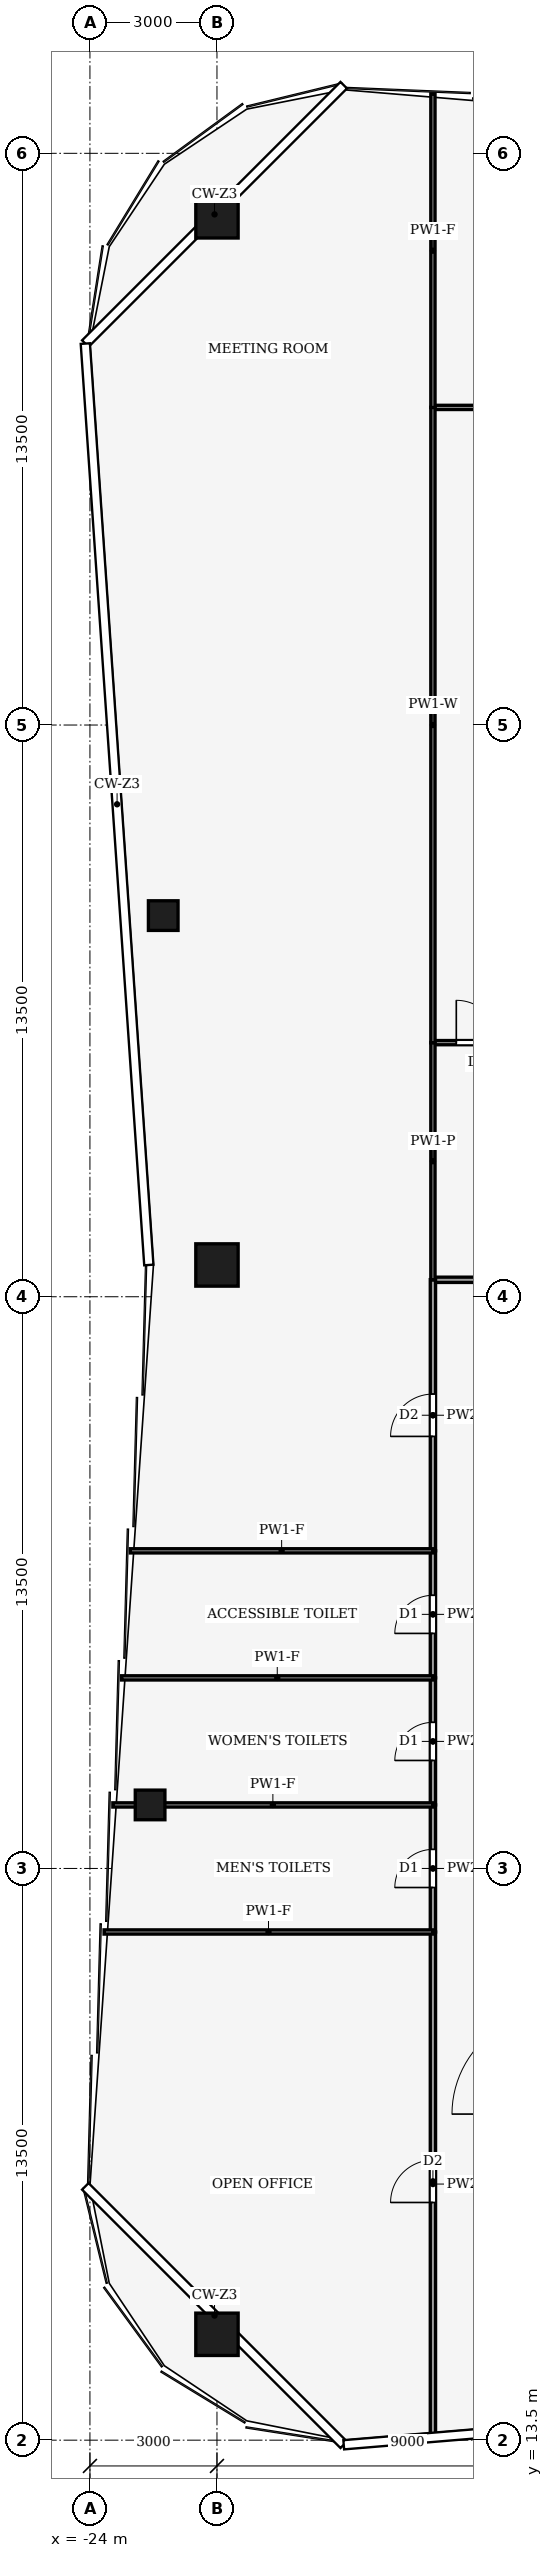
"""IFC4 building model, lengths in metres.
Left out: names, types, materials, properties, quantities, classifications, styles, units other than length and angle.
Written with IfcOpenShell. Run it as: python <this file> out.ifc"""

import sys

from ifc_helpers import new_model, si_unit, direction, frame, frame_2d, origin, origin_2d, place, context, subcontext, project, spatial, rectangle, hollow_rectangle, extrude, element, fill, save


model = new_model("IFC4")
c1 = context("Model", 3, precision=1e-05, world=origin(), true_north=direction((0.0, 1.0)))
c2 = subcontext(c1, "Body", "Model", "MODEL_VIEW")
j1 = project(units=[si_unit("LENGTHUNIT", "METRE"), si_unit("PLANEANGLEUNIT", "RADIAN")], contexts=[c1])
p1 = place(None, origin())
s1 = spatial("IfcSite", under=j1, at=p1, CompositionType="ELEMENT")
p2 = place(p1, origin())
s2 = spatial("IfcBuilding", under=s1, at=p2, CompositionType="ELEMENT")
p3 = place(p2, frame((0.0, 0.0, 198.0)))
s3 = spatial("IfcBuildingStorey", under=s2, at=p3, CompositionType="ELEMENT", Elevation=198.0)
for number, where, z_axis, x_axis in (
    (1, (-21.0, 66.0, 0.0), (0.0, 0.0, 1.0), (1.0, 0.0, 0.0)),
    (2, (-21.0, 16.0, 0.0), (0.0, 0.0, 1.0), (1.0, 0.0, 0.0)),
    (3, (-21.0, 41.25, 0.0), (0.0, 0.0, 1.0), (1.0, 0.0, 0.0)),
):
    element("IfcColumn", number, at=place(p3, frame(where, z_axis=z_axis, x_axis=x_axis)), inside=s3, PredefinedType="COLUMN", context=c2, shape_type="SweptSolid", body=[
        extrude(hollow_rectangle(XDim=1.0, YDim=1.0, WallThickness=0.06, at=origin_2d()), origin(), (0.0, 0.0, 1.0), 4.0),
    ])
for number, where, z_axis, x_axis in (
    (4, (-22.579, 28.5, 0.0), (0.0, 0.0, 1.0), (1.0, 0.0, 0.0)),
    (5, (-22.269, 49.5, 0.0), (0.0, 0.0, 1.0), (1.0, 0.0, 0.0)),
):
    element("IfcColumn", number, at=place(p3, frame(where, z_axis=z_axis, x_axis=x_axis)), inside=s3, PredefinedType="COLUMN", context=c2, shape_type="SweptSolid", body=[
        extrude(hollow_rectangle(XDim=0.7, YDim=0.7, WallThickness=0.03, at=origin_2d()), origin(), (0.0, 0.0, 1.0), 4.0),
    ])
p4 = place(p3, frame((-15.9, 40.9, 0.0), z_axis=(0.0, 0.0, 1.0), x_axis=(1.0, 0.0, 0.0)))
e6 = element("IfcWall", 6, at=p4, inside=s3, PredefinedType="PARTITIONING", context=c2, shape_type="SweptSolid", body=[
    extrude(rectangle(XDim=6.9, YDim=0.125, at=frame_2d((3.45, 0.0))), origin(), (0.0, 0.0, 1.0), 3.44),
])
p5 = place(p4, frame((2.95, 0.0, 0.0)))
e7 = element("IfcOpeningElement", 7, at=p5, cuts=e6, PredefinedType="OPENING", context=c2, shape_type="SweptSolid", body=[
    extrude(rectangle(XDim=1.0, YDim=2.1, at=frame_2d((0.5, 1.05))), frame((0.0, 0.073, 0.0), z_axis=(0.0, -1.0, 0.0), x_axis=(1.0, 0.0, 0.0)), (0.0, 0.0, 1.0), 0.145),
])
p6 = place(p3, frame((-15.9, 13.595, 0.0), z_axis=(0.0, 0.0, 1.0), x_axis=(0.0, 1.0, 0.0)))
e8 = element("IfcWall", 8, at=p6, inside=s3, PredefinedType="PARTITIONING", context=c2, shape_type="SweptSolid", body=[
    extrude(rectangle(XDim=11.905, YDim=0.125, at=frame_2d((5.953, 0.0))), origin(), (0.0, 0.0, 1.0), 3.04),
])
p7 = place(p6, frame((5.518, 0.0, 0.0)))
e9 = element("IfcOpeningElement", 9, at=p7, cuts=e8, PredefinedType="OPENING", context=c2, shape_type="SweptSolid", body=[
    extrude(rectangle(XDim=1.0, YDim=2.1, at=frame_2d((0.5, 1.05))), frame((0.0, 0.073, 0.0), z_axis=(0.0, -1.0, 0.0), x_axis=(1.0, 0.0, 0.0)), (0.0, 0.0, 1.0), 0.145),
])
p8 = place(p3, frame((-15.9, 25.5, 0.0), z_axis=(0.0, 0.0, 1.0), x_axis=(0.0, 1.0, 0.0)))
e10 = element("IfcWall", 10, at=p8, inside=s3, PredefinedType="PARTITIONING", context=c2, shape_type="SweptSolid", body=[
    extrude(rectangle(XDim=3.0, YDim=0.125, at=frame_2d((1.5, 0.0))), origin(), (0.0, 0.0, 1.0), 3.87),
])
p9 = place(p8, frame((1.05, 0.0, 0.0)))
e11 = element("IfcOpeningElement", 11, at=p9, cuts=e10, PredefinedType="OPENING", context=c2, shape_type="SweptSolid", body=[
    extrude(rectangle(XDim=0.9, YDim=2.1, at=frame_2d((0.45, 1.05))), frame((0.0, 0.073, 0.0), z_axis=(0.0, -1.0, 0.0), x_axis=(1.0, 0.0, 0.0)), (0.0, 0.0, 1.0), 0.145),
])
p10 = place(p3, frame((-15.9, 28.5, 0.0), z_axis=(0.0, 0.0, 1.0), x_axis=(0.0, 1.0, 0.0)))
e12 = element("IfcWall", 12, at=p10, inside=s3, PredefinedType="PARTITIONING", context=c2, shape_type="SweptSolid", body=[
    extrude(rectangle(XDim=3.0, YDim=0.125, at=frame_2d((1.5, 0.0))), origin(), (0.0, 0.0, 1.0), 3.87),
])
p11 = place(p10, frame((1.05, 0.0, 0.0)))
e13 = element("IfcOpeningElement", 13, at=p11, cuts=e12, PredefinedType="OPENING", context=c2, shape_type="SweptSolid", body=[
    extrude(rectangle(XDim=0.9, YDim=2.1, at=frame_2d((0.45, 1.05))), frame((0.0, 0.073, 0.0), z_axis=(0.0, -1.0, 0.0), x_axis=(1.0, 0.0, 0.0)), (0.0, 0.0, 1.0), 0.145),
])
p12 = place(p3, frame((-15.9, 31.5, 0.0), z_axis=(0.0, 0.0, 1.0), x_axis=(0.0, 1.0, 0.0)))
e14 = element("IfcWall", 14, at=p12, inside=s3, PredefinedType="PARTITIONING", context=c2, shape_type="SweptSolid", body=[
    extrude(rectangle(XDim=3.0, YDim=0.125, at=frame_2d((1.5, 0.0))), origin(), (0.0, 0.0, 1.0), 3.87),
])
p13 = place(p12, frame((1.05, 0.0, 0.0)))
e15 = element("IfcOpeningElement", 15, at=p13, cuts=e14, PredefinedType="OPENING", context=c2, shape_type="SweptSolid", body=[
    extrude(rectangle(XDim=0.9, YDim=2.1, at=frame_2d((0.45, 1.05))), frame((0.0, 0.073, 0.0), z_axis=(0.0, -1.0, 0.0), x_axis=(1.0, 0.0, 0.0)), (0.0, 0.0, 1.0), 0.145),
])
p14 = place(p3, frame((-15.9, 34.5, 0.0), z_axis=(0.0, 0.0, 1.0), x_axis=(0.0, 1.0, 0.0)))
e16 = element("IfcWall", 16, at=p14, inside=s3, PredefinedType="PARTITIONING", context=c2, shape_type="SweptSolid", body=[
    extrude(rectangle(XDim=6.404, YDim=0.125, at=frame_2d((3.202, 0.0))), origin(), (0.0, 0.0, 1.0), 3.14),
])
p15 = place(p14, frame((2.702, 0.0, 0.0)))
e17 = element("IfcOpeningElement", 17, at=p15, cuts=e16, PredefinedType="OPENING", context=c2, shape_type="SweptSolid", body=[
    extrude(rectangle(XDim=1.0, YDim=2.1, at=frame_2d((0.5, 1.05))), frame((0.0, 0.073, 0.0), z_axis=(0.0, -1.0, 0.0), x_axis=(1.0, 0.0, 0.0)), (0.0, 0.0, 1.0), 0.145),
])
p16 = place(p3, frame((-15.9, 46.5, 0.0), z_axis=(0.0, 0.0, 1.0), x_axis=(1.0, 0.0, 0.0)))
e18 = element("IfcWall", 18, at=p16, inside=s3, PredefinedType="PARTITIONING", context=c2, shape_type="SweptSolid", body=[
    extrude(rectangle(XDim=6.904, YDim=0.1, at=frame_2d((3.452, 0.0))), origin(), (0.0, 0.0, 1.0), 3.44),
])
p17 = place(p16, frame((0.552, 0.0, 0.0)))
e19 = element("IfcOpeningElement", 19, at=p17, cuts=e18, PredefinedType="OPENING", context=c2, shape_type="SweptSolid", body=[
    extrude(rectangle(XDim=1.0, YDim=2.1, at=frame_2d((0.5, 1.05))), frame((0.0, 0.06, 0.0), z_axis=(0.0, -1.0, 0.0), x_axis=(1.0, 0.0, 0.0)), (0.0, 0.0, 1.0), 0.12),
])
p18 = place(p3, frame((-15.9, 46.504, 0.0), z_axis=(0.0, 0.0, 1.0), x_axis=(0.0, -1.0, 0.0)))
e20 = element("IfcWall", 20, at=p18, inside=s3, PredefinedType="PARTITIONING", context=c2, shape_type="SweptSolid", body=[
    extrude(rectangle(XDim=5.608, YDim=0.1, at=frame_2d((2.804, 0.0))), origin(), (0.0, 0.0, 1.0), 3.44),
])
p19 = place(p3, frame((-15.9, 61.5, 0.0), z_axis=(0.0, 0.0, 1.0), x_axis=(1.0, 0.0, 0.0)))
e21 = element("IfcWall", 21, at=p19, inside=s3, PredefinedType="PARTITIONING", context=c2, shape_type="SweptSolid", body=[
    extrude(rectangle(XDim=6.9, YDim=0.1, at=frame_2d((3.45, 0.0))), origin(), (0.0, 0.0, 1.0), 3.24),
])
p20 = place(p19, frame((2.95, 0.0, 0.0)))
e22 = element("IfcOpeningElement", 22, at=p20, cuts=e21, PredefinedType="OPENING", context=c2, shape_type="SweptSolid", body=[
    extrude(rectangle(XDim=1.0, YDim=2.1, at=frame_2d((0.5, 1.05))), frame((0.0, 0.06, 0.0), z_axis=(0.0, -1.0, 0.0), x_axis=(1.0, 0.0, 0.0)), (0.0, 0.0, 1.0), 0.12),
])
p21 = place(p3, frame((-15.9, 61.504, 0.0), z_axis=(0.0, 0.0, 1.0), x_axis=(0.0, -1.0, 0.0)))
e23 = element("IfcWall", 23, at=p21, inside=s3, PredefinedType="PARTITIONING", context=c2, shape_type="SweptSolid", body=[
    extrude(rectangle(XDim=15.008, YDim=0.1, at=frame_2d((7.504, 0.0))), origin(), (0.0, 0.0, 1.0), 3.24),
])
p22 = place(p3, frame((-15.9, 68.905, 0.0), z_axis=(0.0, 0.0, 1.0), x_axis=(0.0, -1.0, 0.0)))
e24 = element("IfcWall", 24, at=p22, inside=s3, PredefinedType="PARTITIONING", context=c2, shape_type="SweptSolid", body=[
    extrude(rectangle(XDim=7.409, YDim=0.1, at=frame_2d((3.705, 0.0))), origin(), (0.0, 0.0, 1.0), 3.04),
])
p23 = place(p3, frame((-15.9, 25.5, 0.0), z_axis=(0.0, 0.0, 1.0), x_axis=(-1.0, 0.0, 0.0)))
e25 = element("IfcWall", 25, at=p23, inside=s3, PredefinedType="PARTITIONING", context=c2, shape_type="SweptSolid", body=[
    extrude(rectangle(XDim=7.766, YDim=0.1, at=frame_2d((3.883, 0.0))), origin(), (0.0, 0.0, 1.0), 3.04),
])
p24 = place(p3, frame((-15.9, 28.5, 0.0), z_axis=(0.0, 0.0, 1.0), x_axis=(-1.0, 0.0, 0.0)))
e26 = element("IfcWall", 26, at=p24, inside=s3, PredefinedType="PARTITIONING", context=c2, shape_type="SweptSolid", body=[
    extrude(rectangle(XDim=7.559, YDim=0.1, at=frame_2d((3.78, 0.0))), origin(), (0.0, 0.0, 1.0), 3.04),
])
p25 = place(p3, frame((-15.9, 31.5, 0.0), z_axis=(0.0, 0.0, 1.0), x_axis=(-1.0, 0.0, 0.0)))
e27 = element("IfcWall", 27, at=p25, inside=s3, PredefinedType="PARTITIONING", context=c2, shape_type="SweptSolid", body=[
    extrude(rectangle(XDim=7.353, YDim=0.1, at=frame_2d((3.676, 0.0))), origin(), (0.0, 0.0, 1.0), 3.04),
])
p26 = place(p3, frame((-15.9, 34.5, 0.0), z_axis=(0.0, 0.0, 1.0), x_axis=(-1.0, 0.0, 0.0)))
e28 = element("IfcWall", 28, at=p26, inside=s3, PredefinedType="PARTITIONING", context=c2, shape_type="SweptSolid", body=[
    extrude(rectangle(XDim=7.146, YDim=0.1, at=frame_2d((3.573, 0.0))), origin(), (0.0, 0.0, 1.0), 3.04),
])
p27 = place(p7, origin())
e29 = element("IfcDoor", 29, at=p27, inside=s3, OperationType="SINGLE_SWING_RIGHT", PredefinedType="DOOR", context=c2, shape_type="SweptSolid", body=[
    extrude(rectangle(XDim=1.0, YDim=2.1, at=frame_2d((0.5, 1.05))), frame((0.0, 0.025, 0.0), z_axis=(0.0, -1.0, 0.0), x_axis=(1.0, 0.0, 0.0)), (0.0, 0.0, 1.0), 0.05),
])
fill(e9, e29)
p28 = place(p9, origin())
e30 = element("IfcDoor", 30, at=p28, inside=s3, OperationType="SINGLE_SWING_RIGHT", PredefinedType="DOOR", context=c2, shape_type="SweptSolid", body=[
    extrude(rectangle(XDim=0.9, YDim=2.1, at=frame_2d((0.45, 1.05))), frame((0.0, 0.025, 0.0), z_axis=(0.0, -1.0, 0.0), x_axis=(1.0, 0.0, 0.0)), (0.0, 0.0, 1.0), 0.05),
])
fill(e11, e30)
p29 = place(p11, origin())
e31 = element("IfcDoor", 31, at=p29, inside=s3, OperationType="SINGLE_SWING_LEFT", PredefinedType="DOOR", context=c2, shape_type="SweptSolid", body=[
    extrude(rectangle(XDim=0.9, YDim=2.1, at=frame_2d((0.45, 1.05))), frame((0.0, 0.025, 0.0), z_axis=(0.0, -1.0, 0.0), x_axis=(1.0, 0.0, 0.0)), (0.0, 0.0, 1.0), 0.05),
])
fill(e13, e31)
p30 = place(p13, origin())
e32 = element("IfcDoor", 32, at=p30, inside=s3, OperationType="SINGLE_SWING_RIGHT", PredefinedType="DOOR", context=c2, shape_type="SweptSolid", body=[
    extrude(rectangle(XDim=0.9, YDim=2.1, at=frame_2d((0.45, 1.05))), frame((0.0, 0.025, 0.0), z_axis=(0.0, -1.0, 0.0), x_axis=(1.0, 0.0, 0.0)), (0.0, 0.0, 1.0), 0.05),
])
fill(e15, e32)
p31 = place(p15, origin())
e33 = element("IfcDoor", 33, at=p31, inside=s3, OperationType="SINGLE_SWING_LEFT", PredefinedType="DOOR", context=c2, shape_type="SweptSolid", body=[
    extrude(rectangle(XDim=1.0, YDim=2.1, at=frame_2d((0.5, 1.05))), frame((0.0, 0.025, 0.0), z_axis=(0.0, -1.0, 0.0), x_axis=(1.0, 0.0, 0.0)), (0.0, 0.0, 1.0), 0.05),
])
fill(e17, e33)
p32 = place(p17, origin())
e34 = element("IfcDoor", 34, at=p32, inside=s3, OperationType="SINGLE_SWING_LEFT", PredefinedType="DOOR", context=c2, shape_type="SweptSolid", body=[
    extrude(rectangle(XDim=1.0, YDim=2.1, at=frame_2d((0.5, 1.05))), frame((0.0, 0.025, 0.0), z_axis=(0.0, -1.0, 0.0), x_axis=(1.0, 0.0, 0.0)), (0.0, 0.0, 1.0), 0.05),
])
fill(e19, e34)
save(model, sys.argv[1])
